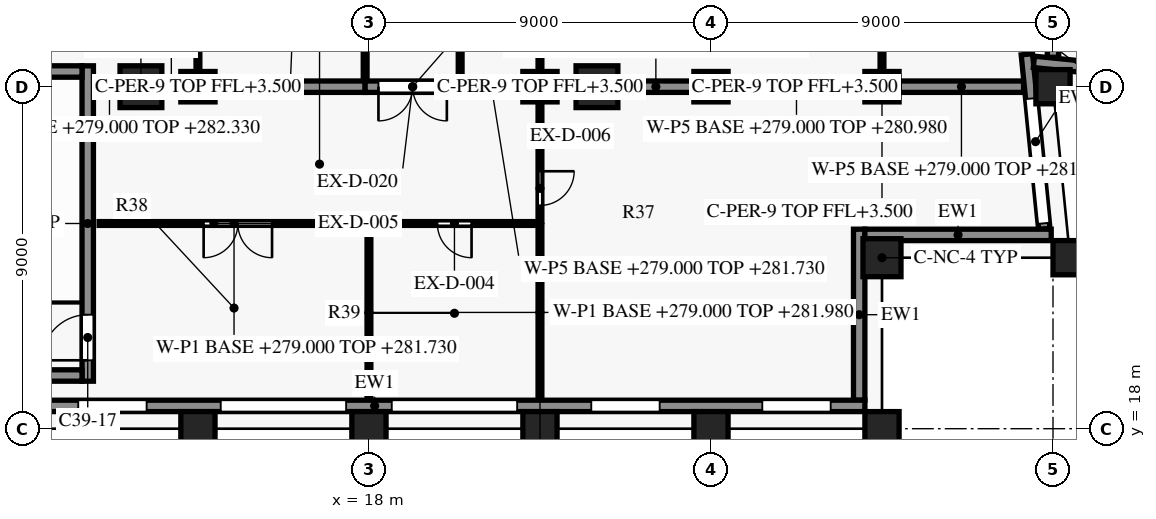
"""IFC4 building model, lengths in metres.
Left out: names, types, materials, properties, quantities, classifications, styles, units other than length and angle.
Written with IfcOpenShell. Run it as: python <this file> out.ifc"""

import sys

from ifc_helpers import new_model, si_unit, direction, frame, frame_2d, origin, origin_2d, place, context, subcontext, project, spatial, rectangle, extrude, element, fill, save


model = new_model("IFC4")
c1 = context("Model", 3, precision=1e-05, world=origin(), true_north=direction((0.0, 1.0)))
c2 = subcontext(c1, "Body", "Model", "MODEL_VIEW")
j1 = project(units=[si_unit("LENGTHUNIT", "METRE"), si_unit("PLANEANGLEUNIT", "RADIAN")], contexts=[c1])
p1 = place(None, origin())
s1 = spatial("IfcSite", under=j1, at=p1, CompositionType="ELEMENT")
p2 = place(p1, origin())
s2 = spatial("IfcBuilding", under=s1, at=p2, CompositionType="ELEMENT")
p3 = place(p2, frame((0.0, 0.0, 279.0)))
s3 = spatial("IfcBuildingStorey", under=s2, at=p3, CompositionType="ELEMENT", Elevation=279.0)
for number, where, z_axis, x_axis in (
    (1, (13.5, 18.0, 0.0), (0.0, 0.0, 1.0), (1.0, 0.0, 0.0)),
    (2, (18.0, 18.0, 0.0), (0.0, 0.0, 1.0), (1.0, 0.0, 0.0)),
    (3, (22.5, 18.0, 0.0), (0.0, 0.0, 1.0), (1.0, 0.0, 0.0)),
    (4, (27.0, 18.0, 0.0), (0.0, 0.0, 1.0), (1.0, 0.0, 0.0)),
    (5, (31.5, 18.0, 0.0), (0.0, 0.0, 1.0), (1.0, 0.0, 0.0)),
    (6, (36.45, 22.5, 0.0), (0.0, 0.0, 1.0), (-0.1, 0.995, 0.0)),
    (7, (36.0, 27.0, 0.0), (0.0, 0.0, 1.0), (-0.1, 0.995, 0.0)),
):
    element("IfcColumn", number, at=place(p3, frame(where, z_axis=z_axis, x_axis=x_axis)), inside=s3, PredefinedType="COLUMN", context=c2, shape_type="SweptSolid", body=[
        extrude(rectangle(XDim=0.9, YDim=0.9, at=origin_2d()), origin(), (0.0, 0.0, 1.0), 3.8),
    ])
p4 = place(p3, frame((31.5, 22.5, 0.0), z_axis=(0.0, 0.0, 1.0), x_axis=(1.0, 0.0, 0.0)))
e8 = element("IfcColumn", 8, at=p4, inside=s3, PredefinedType="COLUMN", context=c2, shape_type="SweptSolid", body=[
    extrude(rectangle(XDim=1.0, YDim=1.0, at=origin_2d()), origin(), (0.0, 0.0, 1.0), 3.8),
])
for number, where, z_axis, x_axis in (
    (9, (12.0, 27.0, 0.0), (0.0, 0.0, 1.0), (1.0, 0.0, 0.0)),
    (10, (24.0, 27.0, 0.0), (0.0, 0.0, 1.0), (1.0, 0.0, 0.0)),
):
    element("IfcColumn", number, at=place(p3, frame(where, z_axis=z_axis, x_axis=x_axis)), inside=s3, PredefinedType="COLUMN", context=c2, shape_type="SweptSolid", body=[
        extrude(rectangle(XDim=1.1, YDim=1.1, at=origin_2d()), origin(), (0.0, 0.0, 1.0), 3.8),
    ])
p5 = place(p3, frame((31.05, 18.6, 0.0), z_axis=(0.0, 0.0, 1.0), x_axis=(-1.0, 0.0, 0.0)))
e11 = element("IfcWall", 11, at=p5, inside=s3, PredefinedType="SOLIDWALL", context=c2, shape_type="SweptSolid", body=[
    extrude(rectangle(XDim=25.8, YDim=0.3, at=frame_2d((12.9, 0.0))), origin(), (0.0, 0.0, 1.0), 3.15),
])
p6 = place(p5, frame((0.9, 0.0, 0.75)))
e12 = element("IfcOpeningElement", 12, at=p6, cuts=e11, PredefinedType="OPENING", context=c2, shape_type="SweptSolid", body=[
    extrude(rectangle(XDim=1.8, YDim=1.8, at=frame_2d((0.9, 0.9))), frame((0.0, 0.16, 0.0), z_axis=(0.0, -1.0, 0.0), x_axis=(1.0, 0.0, 0.0)), (0.0, 0.0, 1.0), 0.32),
])
p7 = place(p5, frame((5.4, 0.0, 0.75)))
e13 = element("IfcOpeningElement", 13, at=p7, cuts=e11, PredefinedType="OPENING", context=c2, shape_type="SweptSolid", body=[
    extrude(rectangle(XDim=1.8, YDim=1.8, at=frame_2d((0.9, 0.9))), frame((0.0, 0.16, 0.0), z_axis=(0.0, -1.0, 0.0), x_axis=(1.0, 0.0, 0.0)), (0.0, 0.0, 1.0), 0.32),
])
p8 = place(p5, frame((9.15, 0.0, 0.15)))
e14 = element("IfcOpeningElement", 14, at=p8, cuts=e11, PredefinedType="OPENING", context=c2, shape_type="SweptSolid", body=[
    extrude(rectangle(XDim=3.3, YDim=2.4, at=frame_2d((1.65, 1.2))), frame((0.0, 0.16, 0.0), z_axis=(0.0, -1.0, 0.0), x_axis=(1.0, 0.0, 0.0)), (0.0, 0.0, 1.0), 0.32),
])
p9 = place(p5, frame((13.65, 0.0, 0.15)))
e15 = element("IfcOpeningElement", 15, at=p9, cuts=e11, PredefinedType="OPENING", context=c2, shape_type="SweptSolid", body=[
    extrude(rectangle(XDim=3.3, YDim=2.4, at=frame_2d((1.65, 1.2))), frame((0.0, 0.16, 0.0), z_axis=(0.0, -1.0, 0.0), x_axis=(1.0, 0.0, 0.0)), (0.0, 0.0, 1.0), 0.32),
])
p10 = place(p5, frame((18.9, 0.0, 0.75)))
e16 = element("IfcOpeningElement", 16, at=p10, cuts=e11, PredefinedType="OPENING", context=c2, shape_type="SweptSolid", body=[
    extrude(rectangle(XDim=1.8, YDim=1.8, at=frame_2d((0.9, 0.9))), frame((0.0, 0.16, 0.0), z_axis=(0.0, -1.0, 0.0), x_axis=(1.0, 0.0, 0.0)), (0.0, 0.0, 1.0), 0.32),
])
p11 = place(p3, frame((30.9, 23.25, 0.0), z_axis=(0.0, 0.0, 1.0), x_axis=(0.0, -1.0, 0.0)))
e17 = element("IfcWall", 17, at=p11, inside=s3, PredefinedType="SOLIDWALL", context=c2, shape_type="SweptSolid", body=[
    extrude(rectangle(XDim=4.5, YDim=0.3, at=frame_2d((2.25, 0.0))), origin(), (0.0, 0.0, 1.0), 3.15),
])
p12 = place(p3, frame((35.953, 23.1, 0.0), z_axis=(0.0, 0.0, 1.0), x_axis=(-1.0, 0.0, 0.0)))
e18 = element("IfcWall", 18, at=p12, inside=s3, PredefinedType="SOLIDWALL", context=c2, shape_type="SweptSolid", body=[
    extrude(rectangle(XDim=4.903, YDim=0.3, at=frame_2d((2.451, 0.0))), origin(), (0.0, 0.0, 1.0), 3.15),
])
p13 = place(p3, frame((35.312, 27.852, 0.0), z_axis=(0.0, 0.0, 1.0), x_axis=(0.099503719021, -0.99503719021, 0.0)))
e19 = element("IfcWall", 19, at=p13, inside=s3, PredefinedType="SOLIDWALL", context=c2, shape_type="SweptSolid", body=[
    extrude(rectangle(XDim=4.62, YDim=0.3, at=frame_2d((2.31, 0.0))), origin(), (0.0, 0.0, 1.0), 3.15),
])
p14 = place(p13, frame((1.17, 0.0, 0.15)))
e20 = element("IfcOpeningElement", 20, at=p14, cuts=e19, PredefinedType="OPENING", context=c2, shape_type="SweptSolid", body=[
    extrude(rectangle(XDim=3.3, YDim=2.4, at=frame_2d((1.65, 1.2))), frame((0.0, 0.16, 0.0), z_axis=(0.0, -1.0, 0.0), x_axis=(1.0, 0.0, 0.0)), (0.0, 0.0, 1.0), 0.32),
])
p15 = place(p3, frame((40.065, 27.197, 0.0), z_axis=(0.0, 0.0, 1.0), x_axis=(-0.995036663613, 0.099508984853, 0.0)))
e21 = element("IfcWall", 21, at=p15, inside=s3, PredefinedType="SOLIDWALL", context=c2, shape_type="SweptSolid", body=[
    extrude(rectangle(XDim=4.59, YDim=0.3, at=frame_2d((2.295, 0.0))), origin(), (0.0, 0.0, 1.0), 3.15),
])
p16 = place(p15, frame((0.15, 0.0, 0.15)))
e22 = element("IfcOpeningElement", 22, at=p16, cuts=e21, PredefinedType="OPENING", context=c2, shape_type="SweptSolid", body=[
    extrude(rectangle(XDim=3.3, YDim=2.4, at=frame_2d((1.65, 1.2))), frame((0.0, 0.16, 0.0), z_axis=(0.0, -1.0, 0.0), x_axis=(1.0, 0.0, 0.0)), (0.0, 0.0, 1.0), 0.32),
])
for number, where, z_axis, x_axis in (
    (23, (7.15, 19.4, 0.0), (0.0, 0.0, 1.0), (1.0, 0.0, 0.0)),
    (24, (7.15, 27.4, 0.0), (0.0, 0.0, 1.0), (1.0, 0.0, 0.0)),
):
    element("IfcWall", number, at=place(p3, frame(where, z_axis=z_axis, x_axis=x_axis)), inside=s3, PredefinedType="SHEAR", context=c2, shape_type="SweptSolid", body=[
        extrude(rectangle(XDim=3.3, YDim=0.3, at=frame_2d((1.65, 0.0))), origin(), (0.0, 0.0, 1.0), 3.5),
    ])
p17 = place(p3, frame((10.6, 19.25, 0.0), z_axis=(0.0, 0.0, 1.0), x_axis=(0.0, 1.0, 0.0)))
e25 = element("IfcWall", 25, at=p17, inside=s3, PredefinedType="SHEAR", context=c2, shape_type="SweptSolid", body=[
    extrude(rectangle(XDim=8.3, YDim=0.3, at=frame_2d((4.15, 0.0))), origin(), (0.0, 0.0, 1.0), 3.5),
])
p18 = place(p17, frame((0.55, 0.0, 0.0)))
e26 = element("IfcOpeningElement", 26, at=p18, cuts=e25, PredefinedType="OPENING", context=c2, shape_type="SweptSolid", body=[
    extrude(rectangle(XDim=1.2, YDim=2.2, at=frame_2d((0.6, 1.1))), frame((0.0, 0.16, 0.0), z_axis=(0.0, -1.0, 0.0), x_axis=(1.0, 0.0, 0.0)), (0.0, 0.0, 1.0), 0.32),
])
p19 = place(p3, frame((18.0, 18.77, 0.0), z_axis=(0.0, 0.0, 1.0), x_axis=(0.0, 1.0, 0.0)))
e27 = element("IfcWall", 27, at=p19, inside=s3, PredefinedType="PARTITIONING", context=c2, shape_type="SweptSolid", body=[
    extrude(rectangle(XDim=4.58, YDim=0.1, at=frame_2d((2.29, 0.0))), origin(), (0.0, 0.0, 1.0), 2.98),
])
p20 = place(p3, frame((22.5, 23.35, 0.0), z_axis=(0.0, 0.0, 1.0), x_axis=(0.0, -1.0, 0.0)))
e28 = element("IfcWall", 28, at=p20, inside=s3, PredefinedType="PARTITIONING", context=c2, shape_type="SweptSolid", body=[
    extrude(rectangle(XDim=4.58, YDim=0.1, at=frame_2d((2.29, 0.0))), origin(), (0.0, 0.0, 1.0), 3.33),
])
p21 = place(p3, frame((18.0, 23.4, 0.0), z_axis=(0.0, 0.0, 1.0), x_axis=(-1.0, 0.0, 0.0)))
e29 = element("IfcWall", 29, at=p21, inside=s3, PredefinedType="PARTITIONING", context=c2, shape_type="SweptSolid", body=[
    extrude(rectangle(XDim=7.1, YDim=0.1, at=frame_2d((3.55, 0.0))), origin(), (0.0, 0.0, 1.0), 2.73),
])
p22 = place(p21, frame((2.55, 0.0, 0.0)))
e30 = element("IfcOpeningElement", 30, at=p22, cuts=e29, PredefinedType="OPENING", context=c2, shape_type="SweptSolid", body=[
    extrude(rectangle(XDim=1.8, YDim=2.1, at=frame_2d((0.9, 1.05))), frame((0.0, 0.06, 0.0), z_axis=(0.0, -1.0, 0.0), x_axis=(1.0, 0.0, 0.0)), (0.0, 0.0, 1.0), 0.12),
])
p23 = place(p3, frame((22.45, 23.4, 0.0), z_axis=(0.0, 0.0, 1.0), x_axis=(-1.0, 0.0, 0.0)))
e31 = element("IfcWall", 31, at=p23, inside=s3, PredefinedType="PARTITIONING", context=c2, shape_type="SweptSolid", body=[
    extrude(rectangle(XDim=4.45, YDim=0.1, at=frame_2d((2.225, 0.0))), origin(), (0.0, 0.0, 1.0), 2.98),
])
p24 = place(p23, frame((1.75, 0.0, 0.0)))
e32 = element("IfcOpeningElement", 32, at=p24, cuts=e31, PredefinedType="OPENING", context=c2, shape_type="SweptSolid", body=[
    extrude(rectangle(XDim=0.9, YDim=2.1, at=frame_2d((0.45, 1.05))), frame((0.0, 0.06, 0.0), z_axis=(0.0, -1.0, 0.0), x_axis=(1.0, 0.0, 0.0)), (0.0, 0.0, 1.0), 0.12),
])
p25 = place(p3, frame((22.5, 26.595, 0.0), z_axis=(0.0, 0.0, 1.0), x_axis=(0.0, -1.0, 0.0)))
e33 = element("IfcWall", 33, at=p25, inside=s3, PredefinedType="PARTITIONING", context=c2, shape_type="SweptSolid", body=[
    extrude(rectangle(XDim=3.145, YDim=0.1, at=frame_2d((1.573, 0.0))), origin(), (0.0, 0.0, 1.0), 3.33),
])
p26 = place(p25, frame((1.82, 0.0, 0.0)))
e34 = element("IfcOpeningElement", 34, at=p26, cuts=e33, PredefinedType="OPENING", context=c2, shape_type="SweptSolid", body=[
    extrude(rectangle(XDim=0.9, YDim=2.1, at=frame_2d((0.45, 1.05))), frame((0.0, 0.06, 0.0), z_axis=(0.0, -1.0, 0.0), x_axis=(1.0, 0.0, 0.0)), (0.0, 0.0, 1.0), 0.12),
])
p27 = place(p3, frame((10.9, 27.0, 0.0), z_axis=(0.0, 0.0, 1.0), x_axis=(1.0, 0.0, 0.0)))
e35 = element("IfcWall", 35, at=p27, inside=s3, PredefinedType="PARTITIONING", context=c2, shape_type="SweptSolid", body=[
    extrude(rectangle(XDim=0.545, YDim=0.3, at=frame_2d((0.272, 0.0))), origin(), (0.0, 0.0, 1.0), 3.33),
])
p28 = place(p3, frame((12.555, 27.0, 0.0), z_axis=(0.0, 0.0, 1.0), x_axis=(1.0, 0.0, 0.0)))
e36 = element("IfcWall", 36, at=p28, inside=s3, PredefinedType="PARTITIONING", context=c2, shape_type="SweptSolid", body=[
    extrude(rectangle(XDim=0.49, YDim=0.3, at=frame_2d((0.245, 0.0))), origin(), (0.0, 0.0, 1.0), 1.98),
])
p29 = place(p3, frame((13.955, 27.0, 0.0), z_axis=(0.0, 0.0, 1.0), x_axis=(1.0, 0.0, 0.0)))
e37 = element("IfcWall", 37, at=p29, inside=s3, PredefinedType="PARTITIONING", context=c2, shape_type="SweptSolid", body=[
    extrude(rectangle(XDim=3.945, YDim=0.3, at=frame_2d((1.972, 0.0))), origin(), (0.0, 0.0, 1.0), 2.73),
])
p30 = place(p3, frame((20.4, 27.0, 0.0), z_axis=(0.0, 0.0, 1.0), x_axis=(-1.0, 0.0, 0.0)))
e38 = element("IfcWall", 38, at=p30, inside=s3, PredefinedType="PARTITIONING", context=c2, shape_type="SweptSolid", body=[
    extrude(rectangle(XDim=2.5, YDim=0.3, at=frame_2d((1.25, 0.0))), origin(), (0.0, 0.0, 1.0), 2.73),
])
p31 = place(p30, frame((0.35, 0.0, 0.0)))
e39 = element("IfcOpeningElement", 39, at=p31, cuts=e38, PredefinedType="OPENING", context=c2, shape_type="SweptSolid", body=[
    extrude(rectangle(XDim=1.8, YDim=2.1, at=frame_2d((0.9, 1.05))), frame((0.0, 0.16, 0.0), z_axis=(0.0, -1.0, 0.0), x_axis=(1.0, 0.0, 0.0)), (0.0, 0.0, 1.0), 0.32),
])
p32 = place(p3, frame((20.4, 27.0, 0.0), z_axis=(0.0, 0.0, 1.0), x_axis=(1.0, 0.0, 0.0)))
e40 = element("IfcWall", 40, at=p32, inside=s3, PredefinedType="PARTITIONING", context=c2, shape_type="SweptSolid", body=[
    extrude(rectangle(XDim=1.645, YDim=0.3, at=frame_2d((0.823, 0.0))), origin(), (0.0, 0.0, 1.0), 2.73),
])
p33 = place(p3, frame((22.955, 27.0, 0.0), z_axis=(0.0, 0.0, 1.0), x_axis=(1.0, 0.0, 0.0)))
e41 = element("IfcWall", 41, at=p33, inside=s3, PredefinedType="PARTITIONING", context=c2, shape_type="SweptSolid", body=[
    extrude(rectangle(XDim=0.49, YDim=0.3, at=frame_2d((0.245, 0.0))), origin(), (0.0, 0.0, 1.0), 1.98),
])
p34 = place(p3, frame((24.555, 27.0, 0.0), z_axis=(0.0, 0.0, 1.0), x_axis=(1.0, 0.0, 0.0)))
e42 = element("IfcWall", 42, at=p34, inside=s3, PredefinedType="PARTITIONING", context=c2, shape_type="SweptSolid", body=[
    extrude(rectangle(XDim=1.99, YDim=0.3, at=frame_2d((0.995, 0.0))), origin(), (0.0, 0.0, 1.0), 1.98),
])
p35 = place(p3, frame((27.455, 27.0, 0.0), z_axis=(0.0, 0.0, 1.0), x_axis=(1.0, 0.0, 0.0)))
e43 = element("IfcWall", 43, at=p35, inside=s3, PredefinedType="PARTITIONING", context=c2, shape_type="SweptSolid", body=[
    extrude(rectangle(XDim=3.59, YDim=0.3, at=frame_2d((1.795, 0.0))), origin(), (0.0, 0.0, 1.0), 1.98),
])
p36 = place(p3, frame((31.955, 27.0, 0.0), z_axis=(0.0, 0.0, 1.0), x_axis=(1.0, 0.0, 0.0)))
e44 = element("IfcWall", 44, at=p36, inside=s3, PredefinedType="PARTITIONING", context=c2, shape_type="SweptSolid", body=[
    extrude(rectangle(XDim=3.271, YDim=0.3, at=frame_2d((1.636, 0.0))), origin(), (0.0, 0.0, 1.0), 2.73),
])
p37 = place(p3, frame((17.9, 27.17, 0.0), z_axis=(0.0, 0.0, 1.0), x_axis=(0.0, 1.0, 0.0)))
e45 = element("IfcWall", 45, at=p37, inside=s3, PredefinedType="PARTITIONING", context=c2, shape_type="SweptSolid", body=[
    extrude(rectangle(XDim=6.28, YDim=0.1, at=frame_2d((3.14, 0.0))), origin(), (0.0, 0.0, 1.0), 2.73),
])
p38 = place(p37, frame((2.63, 0.0, 0.0)))
e46 = element("IfcOpeningElement", 46, at=p38, cuts=e45, PredefinedType="OPENING", context=c2, shape_type="SweptSolid", body=[
    extrude(rectangle(XDim=0.9, YDim=2.1, at=frame_2d((0.45, 1.05))), frame((0.0, 0.06, 0.0), z_axis=(0.0, -1.0, 0.0), x_axis=(1.0, 0.0, 0.0)), (0.0, 0.0, 1.0), 0.12),
])
p39 = place(p3, frame((36.0, 27.774, 0.0), z_axis=(0.0, 0.0, 1.0), x_axis=(0.0, 1.0, 0.0)))
e47 = element("IfcWall", 47, at=p39, inside=s3, PredefinedType="PARTITIONING", context=c2, shape_type="SweptSolid", body=[
    extrude(rectangle(XDim=3.271, YDim=0.3, at=frame_2d((1.636, 0.0))), origin(), (0.0, 0.0, 1.0), 2.73),
])
p40 = place(p3, frame((31.5, 31.045, 0.0), z_axis=(0.0, 0.0, 1.0), x_axis=(0.0, -1.0, 0.0)))
e48 = element("IfcWall", 48, at=p40, inside=s3, PredefinedType="PARTITIONING", context=c2, shape_type="SweptSolid", body=[
    extrude(rectangle(XDim=3.64, YDim=0.1, at=frame_2d((1.82, 0.0))), origin(), (0.0, 0.0, 1.0), 1.98),
])
p41 = place(p3, frame((13.5, 33.45, 0.0), z_axis=(0.0, 0.0, 1.0), x_axis=(0.0, -1.0, 0.0)))
e49 = element("IfcWall", 49, at=p41, inside=s3, PredefinedType="PARTITIONING", context=c2, shape_type="SweptSolid", body=[
    extrude(rectangle(XDim=6.045, YDim=0.1, at=frame_2d((3.022, 0.0))), origin(), (0.0, 0.0, 1.0), 1.98),
])
p42 = place(p3, frame((20.4, 33.45, 0.0), z_axis=(0.0, 0.0, 1.0), x_axis=(0.0, -1.0, 0.0)))
e50 = element("IfcWall", 50, at=p42, inside=s3, PredefinedType="PARTITIONING", context=c2, shape_type="SweptSolid", body=[
    extrude(rectangle(XDim=6.28, YDim=0.1, at=frame_2d((3.14, 0.0))), origin(), (0.0, 0.0, 1.0), 2.73),
])
p43 = place(p42, frame((2.8, 0.0, 0.0)))
e51 = element("IfcOpeningElement", 51, at=p43, cuts=e50, PredefinedType="OPENING", context=c2, shape_type="SweptSolid", body=[
    extrude(rectangle(XDim=0.8, YDim=2.1, at=frame_2d((0.4, 1.05))), frame((0.0, 0.06, 0.0), z_axis=(0.0, -1.0, 0.0), x_axis=(1.0, 0.0, 0.0)), (0.0, 0.0, 1.0), 0.12),
])
p44 = place(p3, frame((22.5, 33.45, 0.0), z_axis=(0.0, 0.0, 1.0), x_axis=(0.0, -1.0, 0.0)))
e52 = element("IfcWall", 52, at=p44, inside=s3, PredefinedType="PARTITIONING", context=c2, shape_type="SweptSolid", body=[
    extrude(rectangle(XDim=6.045, YDim=0.1, at=frame_2d((3.022, 0.0))), origin(), (0.0, 0.0, 1.0), 1.98),
])
for number, where, z_axis, x_axis in (
    (53, (13.5, 27.0, 0.0), (0.0, 0.0, 1.0), (1.0, 0.0, 0.0)),
    (54, (22.5, 27.0, 0.0), (0.0, 0.0, 1.0), (1.0, 0.0, 0.0)),
    (55, (27.0, 27.0, 0.0), (0.0, 0.0, 1.0), (1.0, 0.0, 0.0)),
    (56, (31.5, 27.0, 0.0), (0.0, 0.0, 1.0), (1.0, 0.0, 0.0)),
):
    element("IfcColumn", number, at=place(p3, frame(where, z_axis=z_axis, x_axis=x_axis)), inside=s3, PredefinedType="COLUMN", context=c2, shape_type="SweptSolid", body=[
        extrude(rectangle(XDim=0.9, YDim=0.8, at=origin_2d()), origin(), (0.0, 0.0, 1.0), 3.5),
    ])
p45 = place(p6, origin())
e57 = element("IfcWindow", 57, at=p45, inside=s3, PartitioningType="SINGLE_PANEL", PredefinedType="WINDOW", context=c2, shape_type="SweptSolid", body=[
    extrude(rectangle(XDim=1.8, YDim=1.8, at=frame_2d((0.9, 0.9))), frame((0.0, 0.03, 0.0), z_axis=(0.0, -1.0, 0.0), x_axis=(1.0, 0.0, 0.0)), (0.0, 0.0, 1.0), 0.06),
])
fill(e12, e57)
p46 = place(p7, origin())
e58 = element("IfcWindow", 58, at=p46, inside=s3, PartitioningType="SINGLE_PANEL", PredefinedType="WINDOW", context=c2, shape_type="SweptSolid", body=[
    extrude(rectangle(XDim=1.8, YDim=1.8, at=frame_2d((0.9, 0.9))), frame((0.0, 0.03, 0.0), z_axis=(0.0, -1.0, 0.0), x_axis=(1.0, 0.0, 0.0)), (0.0, 0.0, 1.0), 0.06),
])
fill(e13, e58)
p47 = place(p8, origin())
e59 = element("IfcWindow", 59, at=p47, inside=s3, PartitioningType="SINGLE_PANEL", PredefinedType="WINDOW", context=c2, shape_type="SweptSolid", body=[
    extrude(rectangle(XDim=3.3, YDim=2.4, at=frame_2d((1.65, 1.2))), frame((0.0, 0.03, 0.0), z_axis=(0.0, -1.0, 0.0), x_axis=(1.0, 0.0, 0.0)), (0.0, 0.0, 1.0), 0.06),
])
fill(e14, e59)
p48 = place(p9, origin())
e60 = element("IfcWindow", 60, at=p48, inside=s3, PartitioningType="SINGLE_PANEL", PredefinedType="WINDOW", context=c2, shape_type="SweptSolid", body=[
    extrude(rectangle(XDim=3.3, YDim=2.4, at=frame_2d((1.65, 1.2))), frame((0.0, 0.03, 0.0), z_axis=(0.0, -1.0, 0.0), x_axis=(1.0, 0.0, 0.0)), (0.0, 0.0, 1.0), 0.06),
])
fill(e15, e60)
p49 = place(p10, origin())
e61 = element("IfcWindow", 61, at=p49, inside=s3, PartitioningType="SINGLE_PANEL", PredefinedType="WINDOW", context=c2, shape_type="SweptSolid", body=[
    extrude(rectangle(XDim=1.8, YDim=1.8, at=frame_2d((0.9, 0.9))), frame((0.0, 0.03, 0.0), z_axis=(0.0, -1.0, 0.0), x_axis=(1.0, 0.0, 0.0)), (0.0, 0.0, 1.0), 0.06),
])
fill(e16, e61)
p50 = place(p14, origin())
e62 = element("IfcWindow", 62, at=p50, inside=s3, PartitioningType="SINGLE_PANEL", PredefinedType="WINDOW", context=c2, shape_type="SweptSolid", body=[
    extrude(rectangle(XDim=3.3, YDim=2.4, at=frame_2d((1.65, 1.2))), frame((0.0, 0.03, 0.0), z_axis=(0.0, -1.0, 0.0), x_axis=(1.0, 0.0, 0.0)), (0.0, 0.0, 1.0), 0.06),
])
fill(e20, e62)
p51 = place(p18, origin())
e63 = element("IfcDoor", 63, at=p51, inside=s3, OperationType="SINGLE_SWING_RIGHT", PredefinedType="DOOR", context=c2, shape_type="SweptSolid", body=[
    extrude(rectangle(XDim=1.2, YDim=2.2, at=frame_2d((0.6, 1.1))), frame((0.0, 0.025, 0.0), z_axis=(0.0, -1.0, 0.0), x_axis=(1.0, 0.0, 0.0)), (0.0, 0.0, 1.0), 0.05),
])
fill(e26, e63)
p52 = place(p24, origin())
e64 = element("IfcDoor", 64, at=p52, inside=s3, OperationType="SINGLE_SWING_RIGHT", PredefinedType="DOOR", context=c2, shape_type="SweptSolid", body=[
    extrude(rectangle(XDim=0.9, YDim=2.1, at=frame_2d((0.45, 1.05))), frame((0.0, 0.025, 0.0), z_axis=(0.0, -1.0, 0.0), x_axis=(1.0, 0.0, 0.0)), (0.0, 0.0, 1.0), 0.05),
])
fill(e32, e64)
p53 = place(p22, origin())
e65 = element("IfcDoor", 65, at=p53, inside=s3, OperationType="DOUBLE_DOOR_SINGLE_SWING", PredefinedType="DOOR", context=c2, shape_type="SweptSolid", body=[
    extrude(rectangle(XDim=1.8, YDim=2.1, at=frame_2d((0.9, 1.05))), frame((0.0, 0.025, 0.0), z_axis=(0.0, -1.0, 0.0), x_axis=(1.0, 0.0, 0.0)), (0.0, 0.0, 1.0), 0.05),
])
fill(e30, e65)
p54 = place(p26, origin())
e66 = element("IfcDoor", 66, at=p54, inside=s3, OperationType="SINGLE_SWING_LEFT", PredefinedType="DOOR", context=c2, shape_type="SweptSolid", body=[
    extrude(rectangle(XDim=0.9, YDim=2.1, at=frame_2d((0.45, 1.05))), frame((0.0, 0.025, 0.0), z_axis=(0.0, -1.0, 0.0), x_axis=(1.0, 0.0, 0.0)), (0.0, 0.0, 1.0), 0.05),
])
fill(e34, e66)
p55 = place(p31, origin())
e67 = element("IfcDoor", 67, at=p55, inside=s3, OperationType="DOUBLE_DOOR_SINGLE_SWING", PredefinedType="DOOR", context=c2, shape_type="SweptSolid", body=[
    extrude(rectangle(XDim=1.8, YDim=2.1, at=frame_2d((0.9, 1.05))), frame((0.0, 0.025, 0.0), z_axis=(0.0, -1.0, 0.0), x_axis=(1.0, 0.0, 0.0)), (0.0, 0.0, 1.0), 0.05),
])
fill(e39, e67)
save(model, sys.argv[1])
